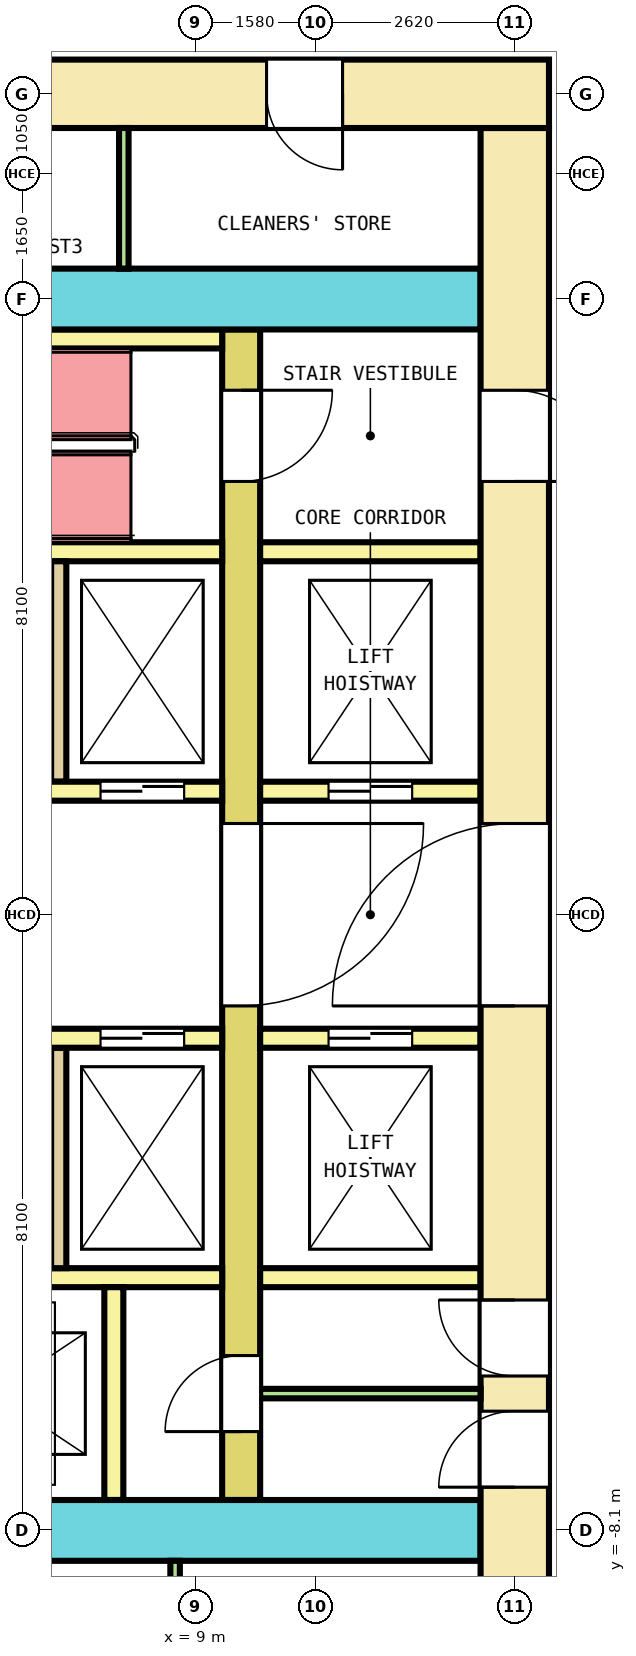
"""IFC4 building model, lengths in metres.
Left out: names, types, materials, properties, quantities, classifications, styles, units other than length and angle.
Written with IfcOpenShell. Run it as: python <this file> out.ifc"""

import sys

from ifc_helpers import new_model, si_unit, direction, frame, frame_2d, origin, place, context, subcontext, project, spatial, rectangle, extrude, element, fill, save


model = new_model("IFC4")
c1 = context("Model", 3, precision=1e-05, world=origin(), true_north=direction((0.0, 1.0)))
c2 = subcontext(c1, "Body", "Model", "MODEL_VIEW")
j1 = project(units=[si_unit("LENGTHUNIT", "METRE"), si_unit("PLANEANGLEUNIT", "RADIAN")], contexts=[c1])
p1 = place(None, origin())
s1 = spatial("IfcSite", under=j1, at=p1, CompositionType="ELEMENT")
p2 = place(p1, origin())
s2 = spatial("IfcBuilding", under=s1, at=p2, CompositionType="ELEMENT")
p3 = place(p2, frame((0.0, 0.0, 36.6)))
s3 = spatial("IfcBuildingStorey", under=s2, at=p3, CompositionType="ELEMENT", Elevation=36.6)
p4 = place(p3, frame((-13.65, 10.8, 0.0), z_axis=(0.0, 0.0, 1.0), x_axis=(1.0, 0.0, 0.0)))
e1 = element("IfcWall", 1, at=p4, inside=s3, PredefinedType="SHEAR", context=c2, shape_type="SweptSolid", body=[
    extrude(rectangle(XDim=27.3, YDim=0.9, at=frame_2d((13.65, 0.0))), origin(), (0.0, 0.0, 1.0), 4.1),
])
p5 = place(p4, frame((2.4, 0.0, 0.0)))
e2 = element("IfcOpeningElement", 2, at=p5, cuts=e1, PredefinedType="OPENING", context=c2, shape_type="SweptSolid", body=[
    extrude(rectangle(XDim=1.0, YDim=2.1, at=frame_2d((0.5, 1.05))), frame((0.0, 0.46, 0.0), z_axis=(0.0, -1.0, 0.0), x_axis=(1.0, 0.0, 0.0)), (0.0, 0.0, 1.0), 0.92),
])
p6 = place(p4, frame((6.494, 0.0, 0.0)))
e3 = element("IfcOpeningElement", 3, at=p6, cuts=e1, PredefinedType="OPENING", context=c2, shape_type="SweptSolid", body=[
    extrude(rectangle(XDim=1.0, YDim=2.1, at=frame_2d((0.5, 1.05))), frame((0.0, 0.46, 0.0), z_axis=(0.0, -1.0, 0.0), x_axis=(1.0, 0.0, 0.0)), (0.0, 0.0, 1.0), 0.92),
])
p7 = place(p4, frame((10.556, 0.0, 0.0)))
e4 = element("IfcOpeningElement", 4, at=p7, cuts=e1, PredefinedType="OPENING", context=c2, shape_type="SweptSolid", body=[
    extrude(rectangle(XDim=1.0, YDim=2.1, at=frame_2d((0.5, 1.05))), frame((0.0, 0.46, 0.0), z_axis=(0.0, -1.0, 0.0), x_axis=(1.0, 0.0, 0.0)), (0.0, 0.0, 1.0), 0.92),
])
p8 = place(p4, frame((18.859, 0.0, 0.0)))
e5 = element("IfcOpeningElement", 5, at=p8, cuts=e1, PredefinedType="OPENING", context=c2, shape_type="SweptSolid", body=[
    extrude(rectangle(XDim=1.0, YDim=2.1, at=frame_2d((0.5, 1.05))), frame((0.0, 0.46, 0.0), z_axis=(0.0, -1.0, 0.0), x_axis=(1.0, 0.0, 0.0)), (0.0, 0.0, 1.0), 0.92),
])
p9 = place(p4, frame((23.584, 0.0, 0.0)))
e6 = element("IfcOpeningElement", 6, at=p9, cuts=e1, PredefinedType="OPENING", context=c2, shape_type="SweptSolid", body=[
    extrude(rectangle(XDim=1.0, YDim=2.1, at=frame_2d((0.5, 1.05))), frame((0.0, 0.46, 0.0), z_axis=(0.0, -1.0, 0.0), x_axis=(1.0, 0.0, 0.0)), (0.0, 0.0, 1.0), 0.92),
])
p10 = place(p4, frame((14.575, 0.0, 0.0)))
e7 = element("IfcOpeningElement", 7, at=p10, cuts=e1, PredefinedType="OPENING", context=c2, shape_type="SweptSolid", body=[
    extrude(rectangle(XDim=1.4, YDim=2.1, at=frame_2d((0.7, 1.05))), frame((0.0, 0.46, 0.0), z_axis=(0.0, -1.0, 0.0), x_axis=(1.0, 0.0, 0.0)), (0.0, 0.0, 1.0), 0.92),
])
p11 = place(p3, frame((13.2, -10.35, 0.0), z_axis=(0.0, 0.0, 1.0), x_axis=(0.0, 1.0, 0.0)))
e8 = element("IfcWall", 8, at=p11, inside=s3, PredefinedType="SHEAR", context=c2, shape_type="SweptSolid", body=[
    extrude(rectangle(XDim=20.7, YDim=0.9, at=frame_2d((10.35, 0.0))), origin(), (0.0, 0.0, 1.0), 4.1),
])
p12 = place(p11, frame((9.15, 0.0, 0.0)))
e9 = element("IfcOpeningElement", 9, at=p12, cuts=e8, PredefinedType="OPENING", context=c2, shape_type="SweptSolid", body=[
    extrude(rectangle(XDim=2.4, YDim=2.1, at=frame_2d((1.2, 1.05))), frame((0.0, 0.46, 0.0), z_axis=(0.0, -1.0, 0.0), x_axis=(1.0, 0.0, 0.0)), (0.0, 0.0, 1.0), 0.92),
])
p13 = place(p11, frame((16.05, 0.0, 0.0)))
e10 = element("IfcOpeningElement", 10, at=p13, cuts=e8, PredefinedType="OPENING", context=c2, shape_type="SweptSolid", body=[
    extrude(rectangle(XDim=1.2, YDim=2.1, at=frame_2d((0.6, 1.05))), frame((0.0, 0.46, 0.0), z_axis=(0.0, -1.0, 0.0), x_axis=(1.0, 0.0, 0.0)), (0.0, 0.0, 1.0), 0.92),
])
p14 = place(p11, frame((2.819, 0.0, 0.0)))
e11 = element("IfcOpeningElement", 11, at=p14, cuts=e8, PredefinedType="OPENING", context=c2, shape_type="SweptSolid", body=[
    extrude(rectangle(XDim=1.0, YDim=2.1, at=frame_2d((0.5, 1.05))), frame((0.0, 0.46, 0.0), z_axis=(0.0, -1.0, 0.0), x_axis=(1.0, 0.0, 0.0)), (0.0, 0.0, 1.0), 0.92),
])
p15 = place(p11, frame((4.281, 0.0, 0.0)))
e12 = element("IfcOpeningElement", 12, at=p15, cuts=e8, PredefinedType="OPENING", context=c2, shape_type="SweptSolid", body=[
    extrude(rectangle(XDim=1.0, YDim=2.1, at=frame_2d((0.5, 1.05))), frame((0.0, 0.46, 0.0), z_axis=(0.0, -1.0, 0.0), x_axis=(1.0, 0.0, 0.0)), (0.0, 0.0, 1.0), 0.92),
])
p16 = place(p3, frame((-12.75, 8.1, 0.0), z_axis=(0.0, 0.0, 1.0), x_axis=(1.0, 0.0, 0.0)))
e13 = element("IfcWall", 13, at=p16, inside=s3, PredefinedType="SHEAR", context=c2, shape_type="SweptSolid", body=[
    extrude(rectangle(XDim=25.5, YDim=0.8, at=frame_2d((12.75, 0.0))), origin(), (0.0, 0.0, 1.0), 4.1),
])
p17 = place(p16, frame((13.675, 0.0, 0.0)))
e14 = element("IfcOpeningElement", 14, at=p17, cuts=e13, PredefinedType="OPENING", context=c2, shape_type="SweptSolid", body=[
    extrude(rectangle(XDim=1.4, YDim=2.1, at=frame_2d((0.7, 1.05))), frame((0.0, 0.41, 0.0), z_axis=(0.0, -1.0, 0.0), x_axis=(1.0, 0.0, 0.0)), (0.0, 0.0, 1.0), 0.82),
])
p18 = place(p3, frame((-12.75, -8.1, 0.0), z_axis=(0.0, 0.0, 1.0), x_axis=(1.0, 0.0, 0.0)))
e15 = element("IfcWall", 15, at=p18, inside=s3, PredefinedType="SHEAR", context=c2, shape_type="SweptSolid", body=[
    extrude(rectangle(XDim=25.5, YDim=0.8, at=frame_2d((12.75, 0.0))), origin(), (0.0, 0.0, 1.0), 4.1),
])
p19 = place(p18, frame((14.3, 0.0, 0.0)))
e16 = element("IfcOpeningElement", 16, at=p19, cuts=e15, PredefinedType="OPENING", context=c2, shape_type="SweptSolid", body=[
    extrude(rectangle(XDim=1.2, YDim=2.1, at=frame_2d((0.6, 1.05))), frame((0.0, 0.41, 0.0), z_axis=(0.0, -1.0, 0.0), x_axis=(1.0, 0.0, 0.0)), (0.0, 0.0, 1.0), 0.82),
])
p20 = place(p3, frame((9.6, -7.7, 0.0), z_axis=(0.0, 0.0, 1.0), x_axis=(0.0, 1.0, 0.0)))
e17 = element("IfcWall", 17, at=p20, inside=s3, PredefinedType="SHEAR", context=c2, shape_type="SweptSolid", body=[
    extrude(rectangle(XDim=15.4, YDim=0.5, at=frame_2d((7.7, 0.0))), origin(), (0.0, 0.0, 1.0), 4.1),
])
p21 = place(p20, frame((6.5, 0.0, 0.0)))
e18 = element("IfcOpeningElement", 18, at=p21, cuts=e17, PredefinedType="OPENING", context=c2, shape_type="SweptSolid", body=[
    extrude(rectangle(XDim=2.4, YDim=2.1, at=frame_2d((1.2, 1.05))), frame((0.0, 0.26, 0.0), z_axis=(0.0, -1.0, 0.0), x_axis=(1.0, 0.0, 0.0)), (0.0, 0.0, 1.0), 0.52),
])
p22 = place(p20, frame((13.4, 0.0, 0.0)))
e19 = element("IfcOpeningElement", 19, at=p22, cuts=e17, PredefinedType="OPENING", context=c2, shape_type="SweptSolid", body=[
    extrude(rectangle(XDim=1.2, YDim=2.1, at=frame_2d((0.6, 1.05))), frame((0.0, 0.26, 0.0), z_axis=(0.0, -1.0, 0.0), x_axis=(1.0, 0.0, 0.0)), (0.0, 0.0, 1.0), 0.52),
])
p23 = place(p20, frame((0.9, 0.0, 0.0)))
e20 = element("IfcOpeningElement", 20, at=p23, cuts=e17, PredefinedType="OPENING", context=c2, shape_type="SweptSolid", body=[
    extrude(rectangle(XDim=1.0, YDim=2.1, at=frame_2d((0.5, 1.05))), frame((0.0, 0.26, 0.0), z_axis=(0.0, -1.0, 0.0), x_axis=(1.0, 0.0, 0.0)), (0.0, 0.0, 1.0), 0.52),
])
p24 = place(p3, frame((-9.35, 1.625, 0.0), z_axis=(0.0, 0.0, 1.0), x_axis=(1.0, 0.0, 0.0)))
e21 = element("IfcWall", 21, at=p24, inside=s3, PredefinedType="SOLIDWALL", context=c2, shape_type="SweptSolid", body=[
    extrude(rectangle(XDim=18.7, YDim=0.25, at=frame_2d((9.35, 0.0))), origin(), (0.0, 0.0, 1.0), 4.1),
])
p25 = place(p24, frame((0.5, 0.0, 0.0)))
e22 = element("IfcOpeningElement", 22, at=p25, cuts=e21, PredefinedType="OPENING", context=c2, shape_type="SweptSolid", body=[
    extrude(rectangle(XDim=1.1, YDim=2.1, at=frame_2d((0.55, 1.05))), frame((0.0, 0.135, 0.0), z_axis=(0.0, -1.0, 0.0), x_axis=(1.0, 0.0, 0.0)), (0.0, 0.0, 1.0), 0.27),
])
p26 = place(p24, frame((17.1, 0.0, 0.0)))
e23 = element("IfcOpeningElement", 23, at=p26, cuts=e21, PredefinedType="OPENING", context=c2, shape_type="SweptSolid", body=[
    extrude(rectangle(XDim=1.1, YDim=2.1, at=frame_2d((0.55, 1.05))), frame((0.0, 0.135, 0.0), z_axis=(0.0, -1.0, 0.0), x_axis=(1.0, 0.0, 0.0)), (0.0, 0.0, 1.0), 0.27),
])
p27 = place(p3, frame((9.85, 1.625, 0.0), z_axis=(0.0, 0.0, 1.0), x_axis=(1.0, 0.0, 0.0)))
e24 = element("IfcWall", 24, at=p27, inside=s3, PredefinedType="SOLIDWALL", context=c2, shape_type="SweptSolid", body=[
    extrude(rectangle(XDim=2.9, YDim=0.25, at=frame_2d((1.45, 0.0))), origin(), (0.0, 0.0, 1.0), 4.1),
])
p28 = place(p27, frame((0.9, 0.0, 0.0)))
e25 = element("IfcOpeningElement", 25, at=p28, cuts=e24, PredefinedType="OPENING", context=c2, shape_type="SweptSolid", body=[
    extrude(rectangle(XDim=1.1, YDim=2.1, at=frame_2d((0.55, 1.05))), frame((0.0, 0.135, 0.0), z_axis=(0.0, -1.0, 0.0), x_axis=(1.0, 0.0, 0.0)), (0.0, 0.0, 1.0), 0.27),
])
p29 = place(p3, frame((-9.35, 4.775, 0.0), z_axis=(0.0, 0.0, 1.0), x_axis=(1.0, 0.0, 0.0)))
e26 = element("IfcWall", 26, at=p29, inside=s3, PredefinedType="SOLIDWALL", context=c2, shape_type="SweptSolid", body=[
    extrude(rectangle(XDim=18.7, YDim=0.25, at=frame_2d((9.35, 0.0))), origin(), (0.0, 0.0, 1.0), 4.1),
])
p30 = place(p3, frame((9.85, 4.775, 0.0), z_axis=(0.0, 0.0, 1.0), x_axis=(1.0, 0.0, 0.0)))
e27 = element("IfcWall", 27, at=p30, inside=s3, PredefinedType="SOLIDWALL", context=c2, shape_type="SweptSolid", body=[
    extrude(rectangle(XDim=2.9, YDim=0.25, at=frame_2d((1.45, 0.0))), origin(), (0.0, 0.0, 1.0), 4.1),
])
p31 = place(p3, frame((7.2, 1.75, 0.0), z_axis=(0.0, 0.0, 1.0), x_axis=(0.0, 1.0, 0.0)))
e28 = element("IfcWall", 28, at=p31, inside=s3, PredefinedType="SOLIDWALL", context=c2, shape_type="SweptSolid", body=[
    extrude(rectangle(XDim=2.9, YDim=0.2, at=frame_2d((1.45, 0.0))), origin(), (0.0, 0.0, 1.0), 4.1),
])
p32 = place(p3, frame((-9.35, -1.625, 0.0), z_axis=(0.0, 0.0, 1.0), x_axis=(1.0, 0.0, 0.0)))
e29 = element("IfcWall", 29, at=p32, inside=s3, PredefinedType="SOLIDWALL", context=c2, shape_type="SweptSolid", body=[
    extrude(rectangle(XDim=18.7, YDim=0.25, at=frame_2d((9.35, 0.0))), origin(), (0.0, 0.0, 1.0), 4.1),
])
p33 = place(p32, frame((0.5, 0.0, 0.0)))
e30 = element("IfcOpeningElement", 30, at=p33, cuts=e29, PredefinedType="OPENING", context=c2, shape_type="SweptSolid", body=[
    extrude(rectangle(XDim=1.1, YDim=2.1, at=frame_2d((0.55, 1.05))), frame((0.0, 0.135, 0.0), z_axis=(0.0, -1.0, 0.0), x_axis=(1.0, 0.0, 0.0)), (0.0, 0.0, 1.0), 0.27),
])
p34 = place(p32, frame((17.1, 0.0, 0.0)))
e31 = element("IfcOpeningElement", 31, at=p34, cuts=e29, PredefinedType="OPENING", context=c2, shape_type="SweptSolid", body=[
    extrude(rectangle(XDim=1.1, YDim=2.1, at=frame_2d((0.55, 1.05))), frame((0.0, 0.135, 0.0), z_axis=(0.0, -1.0, 0.0), x_axis=(1.0, 0.0, 0.0)), (0.0, 0.0, 1.0), 0.27),
])
p35 = place(p3, frame((9.85, -1.625, 0.0), z_axis=(0.0, 0.0, 1.0), x_axis=(1.0, 0.0, 0.0)))
e32 = element("IfcWall", 32, at=p35, inside=s3, PredefinedType="SOLIDWALL", context=c2, shape_type="SweptSolid", body=[
    extrude(rectangle(XDim=2.9, YDim=0.25, at=frame_2d((1.45, 0.0))), origin(), (0.0, 0.0, 1.0), 4.1),
])
p36 = place(p35, frame((0.9, 0.0, 0.0)))
e33 = element("IfcOpeningElement", 33, at=p36, cuts=e32, PredefinedType="OPENING", context=c2, shape_type="SweptSolid", body=[
    extrude(rectangle(XDim=1.1, YDim=2.1, at=frame_2d((0.55, 1.05))), frame((0.0, 0.135, 0.0), z_axis=(0.0, -1.0, 0.0), x_axis=(1.0, 0.0, 0.0)), (0.0, 0.0, 1.0), 0.27),
])
p37 = place(p3, frame((-9.35, -4.775, 0.0), z_axis=(0.0, 0.0, 1.0), x_axis=(1.0, 0.0, 0.0)))
e34 = element("IfcWall", 34, at=p37, inside=s3, PredefinedType="SOLIDWALL", context=c2, shape_type="SweptSolid", body=[
    extrude(rectangle(XDim=18.7, YDim=0.25, at=frame_2d((9.35, 0.0))), origin(), (0.0, 0.0, 1.0), 4.1),
])
p38 = place(p3, frame((9.85, -4.775, 0.0), z_axis=(0.0, 0.0, 1.0), x_axis=(1.0, 0.0, 0.0)))
e35 = element("IfcWall", 35, at=p38, inside=s3, PredefinedType="SOLIDWALL", context=c2, shape_type="SweptSolid", body=[
    extrude(rectangle(XDim=2.9, YDim=0.25, at=frame_2d((1.45, 0.0))), origin(), (0.0, 0.0, 1.0), 4.1),
])
p39 = place(p3, frame((7.2, -4.65, 0.0), z_axis=(0.0, 0.0, 1.0), x_axis=(0.0, 1.0, 0.0)))
e36 = element("IfcWall", 36, at=p39, inside=s3, PredefinedType="SOLIDWALL", context=c2, shape_type="SweptSolid", body=[
    extrude(rectangle(XDim=2.9, YDim=0.2, at=frame_2d((1.45, 0.0))), origin(), (0.0, 0.0, 1.0), 4.1),
])
p40 = place(p3, frame((3.55, 7.575, 0.0), z_axis=(0.0, 0.0, 1.0), x_axis=(1.0, 0.0, 0.0)))
e37 = element("IfcWall", 37, at=p40, inside=s3, PredefinedType="SOLIDWALL", context=c2, shape_type="SweptSolid", body=[
    extrude(rectangle(XDim=5.8, YDim=0.25, at=frame_2d((2.9, 0.0))), origin(), (0.0, 0.0, 1.0), 4.1),
])
p41 = place(p3, frame((7.925, -7.7, 0.0), z_axis=(0.0, 0.0, 1.0), x_axis=(0.0, 1.0, 0.0)))
e38 = element("IfcWall", 38, at=p41, inside=s3, PredefinedType="SOLIDWALL", context=c2, shape_type="SweptSolid", body=[
    extrude(rectangle(XDim=2.8, YDim=0.25, at=frame_2d((1.4, 0.0))), origin(), (0.0, 0.0, 1.0), 4.1),
])
p42 = place(p3, frame((9.85, -6.3, 0.0), z_axis=(0.0, 0.0, 1.0), x_axis=(1.0, 0.0, 0.0)))
e39 = element("IfcWall", 39, at=p42, inside=s3, PredefinedType="PARTITIONING", context=c2, shape_type="SweptSolid", body=[
    extrude(rectangle(XDim=2.9, YDim=0.125, at=frame_2d((1.45, 0.0))), origin(), (0.0, 0.0, 1.0), 4.1),
])
for number, where, z_axis, x_axis in (
    (40, (8.056, 8.5, 0.0), (0.0, 0.0, 1.0), (0.0, 1.0, 0.0)),
    (41, (8.731, -10.35, 0.0), (0.0, 0.0, 1.0), (0.0, 1.0, 0.0)),
):
    element("IfcWall", number, at=place(p3, frame(where, z_axis=z_axis, x_axis=x_axis)), inside=s3, PredefinedType="PARTITIONING", context=c2, shape_type="SweptSolid", body=[
        extrude(rectangle(XDim=1.85, YDim=0.125, at=frame_2d((0.925, 0.0))), origin(), (0.0, 0.0, 1.0), 4.1),
    ])
p43 = place(p26, origin())
e42 = element("IfcDoor", 42, at=p43, inside=s3, OperationType="DOUBLE_DOOR_SLIDING", PredefinedType="DOOR", context=c2, shape_type="SweptSolid", body=[
    extrude(rectangle(XDim=1.1, YDim=2.1, at=frame_2d((0.55, 1.05))), frame((0.0, 0.075, 0.0), z_axis=(0.0, -1.0, 0.0), x_axis=(1.0, 0.0, 0.0)), (0.0, 0.0, 1.0), 0.15),
])
fill(e23, e42)
p44 = place(p28, origin())
e43 = element("IfcDoor", 43, at=p44, inside=s3, OperationType="DOUBLE_DOOR_SLIDING", PredefinedType="DOOR", context=c2, shape_type="SweptSolid", body=[
    extrude(rectangle(XDim=1.1, YDim=2.1, at=frame_2d((0.55, 1.05))), frame((0.0, 0.075, 0.0), z_axis=(0.0, -1.0, 0.0), x_axis=(1.0, 0.0, 0.0)), (0.0, 0.0, 1.0), 0.15),
])
fill(e25, e43)
p45 = place(p34, origin())
e44 = element("IfcDoor", 44, at=p45, inside=s3, OperationType="DOUBLE_DOOR_SLIDING", PredefinedType="DOOR", context=c2, shape_type="SweptSolid", body=[
    extrude(rectangle(XDim=1.1, YDim=2.1, at=frame_2d((0.55, 1.05))), frame((0.0, 0.075, 0.0), z_axis=(0.0, -1.0, 0.0), x_axis=(1.0, 0.0, 0.0)), (0.0, 0.0, 1.0), 0.15),
])
fill(e31, e44)
p46 = place(p36, origin())
e45 = element("IfcDoor", 45, at=p46, inside=s3, OperationType="DOUBLE_DOOR_SLIDING", PredefinedType="DOOR", context=c2, shape_type="SweptSolid", body=[
    extrude(rectangle(XDim=1.1, YDim=2.1, at=frame_2d((0.55, 1.05))), frame((0.0, 0.075, 0.0), z_axis=(0.0, -1.0, 0.0), x_axis=(1.0, 0.0, 0.0)), (0.0, 0.0, 1.0), 0.15),
])
fill(e33, e45)
p47 = place(p21, origin())
e46 = element("IfcDoor", 46, at=p47, inside=s3, OperationType="DOUBLE_DOOR_SINGLE_SWING", PredefinedType="DOOR", context=c2, shape_type="SweptSolid", body=[
    extrude(rectangle(XDim=2.4, YDim=2.1, at=frame_2d((1.2, 1.05))), frame((0.0, 0.2, 0.0), z_axis=(0.0, -1.0, 0.0), x_axis=(1.0, 0.0, 0.0)), (0.0, 0.0, 1.0), 0.4),
])
fill(e18, e46)
p48 = place(p12, origin())
e47 = element("IfcDoor", 47, at=p48, inside=s3, OperationType="DOUBLE_DOOR_SINGLE_SWING", PredefinedType="DOOR", context=c2, shape_type="SweptSolid", body=[
    extrude(rectangle(XDim=2.4, YDim=2.1, at=frame_2d((1.2, 1.05))), frame((0.0, 0.3, 0.0), z_axis=(0.0, -1.0, 0.0), x_axis=(1.0, 0.0, 0.0)), (0.0, 0.0, 1.0), 0.6),
])
fill(e9, e47)
p49 = place(p22, origin())
e48 = element("IfcDoor", 48, at=p49, inside=s3, OperationType="SINGLE_SWING_RIGHT", PredefinedType="DOOR", context=c2, shape_type="SweptSolid", body=[
    extrude(rectangle(XDim=1.2, YDim=2.1, at=frame_2d((0.6, 1.05))), frame((0.0, 0.2, 0.0), z_axis=(0.0, -1.0, 0.0), x_axis=(1.0, 0.0, 0.0)), (0.0, 0.0, 1.0), 0.4),
])
fill(e19, e48)
p50 = place(p13, origin())
e49 = element("IfcDoor", 49, at=p50, inside=s3, OperationType="SINGLE_SWING_LEFT", PredefinedType="DOOR", context=c2, shape_type="SweptSolid", body=[
    extrude(rectangle(XDim=1.2, YDim=2.1, at=frame_2d((0.6, 1.05))), frame((0.0, 0.3, 0.0), z_axis=(0.0, -1.0, 0.0), x_axis=(1.0, 0.0, 0.0)), (0.0, 0.0, 1.0), 0.6),
])
fill(e10, e49)
p51 = place(p23, origin())
e50 = element("IfcDoor", 50, at=p51, inside=s3, OperationType="SINGLE_SWING_RIGHT", PredefinedType="DOOR", context=c2, shape_type="SweptSolid", body=[
    extrude(rectangle(XDim=1.0, YDim=2.1, at=frame_2d((0.5, 1.05))), frame((0.0, 0.2, 0.0), z_axis=(0.0, -1.0, 0.0), x_axis=(1.0, 0.0, 0.0)), (0.0, 0.0, 1.0), 0.4),
])
fill(e20, e50)
p52 = place(p14, origin())
e51 = element("IfcDoor", 51, at=p52, inside=s3, OperationType="SINGLE_SWING_LEFT", PredefinedType="DOOR", context=c2, shape_type="SweptSolid", body=[
    extrude(rectangle(XDim=1.0, YDim=2.1, at=frame_2d((0.5, 1.05))), frame((0.0, 0.3, 0.0), z_axis=(0.0, -1.0, 0.0), x_axis=(1.0, 0.0, 0.0)), (0.0, 0.0, 1.0), 0.6),
])
fill(e11, e51)
p53 = place(p15, origin())
e52 = element("IfcDoor", 52, at=p53, inside=s3, OperationType="SINGLE_SWING_RIGHT", PredefinedType="DOOR", context=c2, shape_type="SweptSolid", body=[
    extrude(rectangle(XDim=1.0, YDim=2.1, at=frame_2d((0.5, 1.05))), frame((0.0, 0.3, 0.0), z_axis=(0.0, -1.0, 0.0), x_axis=(1.0, 0.0, 0.0)), (0.0, 0.0, 1.0), 0.6),
])
fill(e12, e52)
p54 = place(p9, origin())
e53 = element("IfcDoor", 53, at=p54, inside=s3, OperationType="SINGLE_SWING_LEFT", PredefinedType="DOOR", context=c2, shape_type="SweptSolid", body=[
    extrude(rectangle(XDim=1.0, YDim=2.1, at=frame_2d((0.5, 1.05))), frame((0.0, 0.3, 0.0), z_axis=(0.0, -1.0, 0.0), x_axis=(1.0, 0.0, 0.0)), (0.0, 0.0, 1.0), 0.6),
])
fill(e6, e53)
save(model, sys.argv[1])
